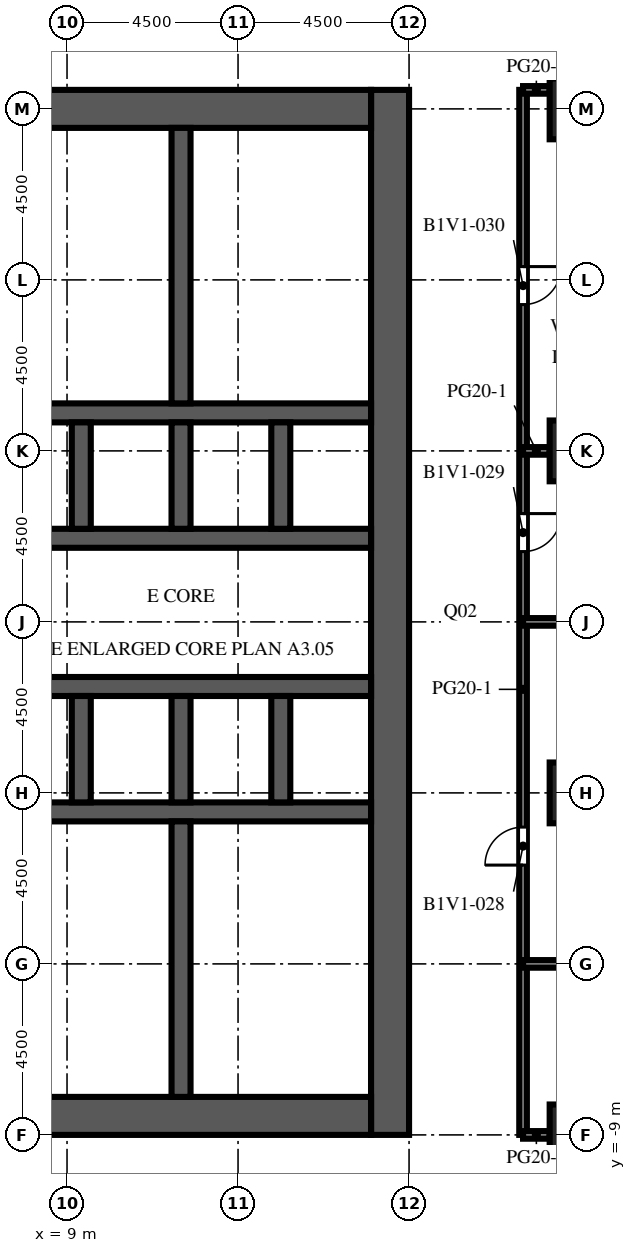
"""IFC4 building model, lengths in metres.
Left out: names, types, materials, properties, quantities, classifications, styles, units other than length and angle.
Written with IfcOpenShell. Run it as: python <this file> out.ifc"""

import sys

from ifc_helpers import new_model, si_unit, direction, frame, frame_2d, origin, origin_2d, place, context, subcontext, project, spatial, rectangle, extrude, element, fill, save


model = new_model("IFC4")
c1 = context("Model", 3, precision=1e-05, world=origin(), true_north=direction((0.0, 1.0)))
c2 = subcontext(c1, "Body", "Model", "MODEL_VIEW")
j1 = project(units=[si_unit("LENGTHUNIT", "METRE"), si_unit("PLANEANGLEUNIT", "RADIAN")], contexts=[c1])
p1 = place(None, origin())
s1 = spatial("IfcSite", under=j1, at=p1, CompositionType="ELEMENT")
p2 = place(p1, origin())
s2 = spatial("IfcBuilding", under=s1, at=p2, CompositionType="ELEMENT")
p3 = place(p2, frame((0.0, 0.0, 27.7)))
s3 = spatial("IfcBuildingStorey", under=s2, at=p3, CompositionType="ELEMENT", Elevation=27.7)
for number, where, z_axis, x_axis in (
    (1, (22.5, -9.0, 0.0), (0.0, 0.0, 1.0), (1.0, 0.0, 0.0)),
    (2, (22.5, 0.0, 0.0), (0.0, 0.0, 1.0), (1.0, 0.0, 0.0)),
    (3, (22.5, 9.0, 0.0), (0.0, 0.0, 1.0), (1.0, 0.0, 0.0)),
    (4, (22.5, 18.0, 0.0), (0.0, 0.0, 1.0), (1.0, 0.0, 0.0)),
):
    element("IfcColumn", number, at=place(p3, frame(where, z_axis=z_axis, x_axis=x_axis)), inside=s3, PredefinedType="COLUMN", context=c2, shape_type="SweptSolid", body=[
        extrude(rectangle(XDim=1.6, YDim=1.6, at=origin_2d()), origin(), (0.0, 0.0, 1.0), 4.1),
    ])
p4 = place(p3, frame((17.5, -9.0, 0.0), z_axis=(0.0, 0.0, 1.0), x_axis=(0.0, 1.0, 0.0)))
e5 = element("IfcWall", 5, at=p4, inside=s3, PredefinedType="SHEAR", context=c2, shape_type="SweptSolid", body=[
    extrude(rectangle(XDim=27.5, YDim=1.0, at=frame_2d((13.75, 0.0))), origin(), (0.0, 0.0, 1.0), 4.1),
])
p5 = place(p4, frame((12.55, 0.0, 0.0)))
e6 = element("IfcOpeningElement", 6, at=p5, cuts=e5, PredefinedType="OPENING", context=c2, shape_type="SweptSolid", body=[
    extrude(rectangle(XDim=2.4, YDim=2.4, at=frame_2d((1.2, 1.2))), frame((0.0, 0.51, 0.0), z_axis=(0.0, -1.0, 0.0), x_axis=(1.0, 0.0, 0.0)), (0.0, 0.0, 1.0), 1.02),
])
p6 = place(p4, frame((6.825, 0.0, 0.0)))
e7 = element("IfcOpeningElement", 7, at=p6, cuts=e5, PredefinedType="OPENING", context=c2, shape_type="SweptSolid", body=[
    extrude(rectangle(XDim=1.2, YDim=2.1, at=frame_2d((0.6, 1.05))), frame((0.0, 0.51, 0.0), z_axis=(0.0, -1.0, 0.0), x_axis=(1.0, 0.0, 0.0)), (0.0, 0.0, 1.0), 1.02),
])
p7 = place(p4, frame((19.475, 0.0, 0.0)))
e8 = element("IfcOpeningElement", 8, at=p7, cuts=e5, PredefinedType="OPENING", context=c2, shape_type="SweptSolid", body=[
    extrude(rectangle(XDim=1.2, YDim=2.1, at=frame_2d((0.6, 1.05))), frame((0.0, 0.51, 0.0), z_axis=(0.0, -1.0, 0.0), x_axis=(1.0, 0.0, 0.0)), (0.0, 0.0, 1.0), 1.02),
])
for number, where, z_axis, x_axis in (
    (9, (7.0, -8.5, 0.0), (0.0, 0.0, 1.0), (1.0, 0.0, 0.0)),
    (10, (7.0, 18.0, 0.0), (0.0, 0.0, 1.0), (1.0, 0.0, 0.0)),
):
    element("IfcWall", number, at=place(p3, frame(where, z_axis=z_axis, x_axis=x_axis)), inside=s3, PredefinedType="SHEAR", context=c2, shape_type="SweptSolid", body=[
        extrude(rectangle(XDim=10.0, YDim=1.0, at=frame_2d((5.0, 0.0))), origin(), (0.0, 0.0, 1.0), 4.1),
    ])
p8 = place(p3, frame((7.0, -0.5, 0.0), z_axis=(0.0, 0.0, 1.0), x_axis=(1.0, 0.0, 0.0)))
e11 = element("IfcWall", 11, at=p8, inside=s3, PredefinedType="SHEAR", context=c2, shape_type="SweptSolid", body=[
    extrude(rectangle(XDim=10.0, YDim=0.5, at=frame_2d((5.0, 0.0))), origin(), (0.0, 0.0, 1.0), 4.1),
])
p9 = place(p3, frame((7.0, 2.8, 0.0), z_axis=(0.0, 0.0, 1.0), x_axis=(1.0, 0.0, 0.0)))
e12 = element("IfcWall", 12, at=p9, inside=s3, PredefinedType="SHEAR", context=c2, shape_type="SweptSolid", body=[
    extrude(rectangle(XDim=10.0, YDim=0.5, at=frame_2d((5.0, 0.0))), origin(), (0.0, 0.0, 1.0), 4.1),
])
p10 = place(p9, frame((0.512, 0.0, 0.0)))
e13 = element("IfcOpeningElement", 13, at=p10, cuts=e12, PredefinedType="OPENING", context=c2, shape_type="SweptSolid", body=[
    extrude(rectangle(XDim=1.1, YDim=2.1, at=frame_2d((0.55, 1.05))), frame((0.0, 0.26, 0.0), z_axis=(0.0, -1.0, 0.0), x_axis=(1.0, 0.0, 0.0)), (0.0, 0.0, 1.0), 0.52),
])
p11 = place(p9, frame((3.137, 0.0, 0.0)))
e14 = element("IfcOpeningElement", 14, at=p11, cuts=e12, PredefinedType="OPENING", context=c2, shape_type="SweptSolid", body=[
    extrude(rectangle(XDim=1.1, YDim=2.1, at=frame_2d((0.55, 1.05))), frame((0.0, 0.26, 0.0), z_axis=(0.0, -1.0, 0.0), x_axis=(1.0, 0.0, 0.0)), (0.0, 0.0, 1.0), 0.52),
])
p12 = place(p9, frame((8.387, 0.0, 0.0)))
e15 = element("IfcOpeningElement", 15, at=p12, cuts=e12, PredefinedType="OPENING", context=c2, shape_type="SweptSolid", body=[
    extrude(rectangle(XDim=1.1, YDim=2.1, at=frame_2d((0.55, 1.05))), frame((0.0, 0.26, 0.0), z_axis=(0.0, -1.0, 0.0), x_axis=(1.0, 0.0, 0.0)), (0.0, 0.0, 1.0), 0.52),
])
p13 = place(p3, frame((7.0, 6.7, 0.0), z_axis=(0.0, 0.0, 1.0), x_axis=(1.0, 0.0, 0.0)))
e16 = element("IfcWall", 16, at=p13, inside=s3, PredefinedType="SHEAR", context=c2, shape_type="SweptSolid", body=[
    extrude(rectangle(XDim=10.0, YDim=0.5, at=frame_2d((5.0, 0.0))), origin(), (0.0, 0.0, 1.0), 4.1),
])
p14 = place(p13, frame((0.512, 0.0, 0.0)))
e17 = element("IfcOpeningElement", 17, at=p14, cuts=e16, PredefinedType="OPENING", context=c2, shape_type="SweptSolid", body=[
    extrude(rectangle(XDim=1.1, YDim=2.1, at=frame_2d((0.55, 1.05))), frame((0.0, 0.26, 0.0), z_axis=(0.0, -1.0, 0.0), x_axis=(1.0, 0.0, 0.0)), (0.0, 0.0, 1.0), 0.52),
])
p15 = place(p13, frame((3.188, 0.0, 0.0)))
e18 = element("IfcOpeningElement", 18, at=p15, cuts=e16, PredefinedType="OPENING", context=c2, shape_type="SweptSolid", body=[
    extrude(rectangle(XDim=1.0, YDim=2.1, at=frame_2d((0.5, 1.05))), frame((0.0, 0.26, 0.0), z_axis=(0.0, -1.0, 0.0), x_axis=(1.0, 0.0, 0.0)), (0.0, 0.0, 1.0), 0.52),
])
p16 = place(p13, frame((5.812, 0.0, 0.0)))
e19 = element("IfcOpeningElement", 19, at=p16, cuts=e16, PredefinedType="OPENING", context=c2, shape_type="SweptSolid", body=[
    extrude(rectangle(XDim=1.0, YDim=2.1, at=frame_2d((0.5, 1.05))), frame((0.0, 0.26, 0.0), z_axis=(0.0, -1.0, 0.0), x_axis=(1.0, 0.0, 0.0)), (0.0, 0.0, 1.0), 0.52),
])
p17 = place(p13, frame((8.438, 0.0, 0.0)))
e20 = element("IfcOpeningElement", 20, at=p17, cuts=e16, PredefinedType="OPENING", context=c2, shape_type="SweptSolid", body=[
    extrude(rectangle(XDim=1.0, YDim=2.1, at=frame_2d((0.5, 1.05))), frame((0.0, 0.26, 0.0), z_axis=(0.0, -1.0, 0.0), x_axis=(1.0, 0.0, 0.0)), (0.0, 0.0, 1.0), 0.52),
])
p18 = place(p3, frame((7.0, 10.0, 0.0), z_axis=(0.0, 0.0, 1.0), x_axis=(1.0, 0.0, 0.0)))
e21 = element("IfcWall", 21, at=p18, inside=s3, PredefinedType="SHEAR", context=c2, shape_type="SweptSolid", body=[
    extrude(rectangle(XDim=10.0, YDim=0.5, at=frame_2d((5.0, 0.0))), origin(), (0.0, 0.0, 1.0), 4.1),
])
for number, where, z_axis, x_axis in (
    (22, (9.375, -0.25, 0.0), (0.0, 0.0, 1.0), (0.0, 1.0, 0.0)),
    (23, (9.375, 6.95, 0.0), (0.0, 0.0, 1.0), (0.0, 1.0, 0.0)),
    (24, (12.0, -0.25, 0.0), (0.0, 0.0, 1.0), (0.0, 1.0, 0.0)),
    (25, (12.0, 6.95, 0.0), (0.0, 0.0, 1.0), (0.0, 1.0, 0.0)),
    (26, (14.625, -0.25, 0.0), (0.0, 0.0, 1.0), (0.0, 1.0, 0.0)),
    (27, (14.625, 6.95, 0.0), (0.0, 0.0, 1.0), (0.0, 1.0, 0.0)),
):
    element("IfcWall", number, at=place(p3, frame(where, z_axis=z_axis, x_axis=x_axis)), inside=s3, PredefinedType="SHEAR", context=c2, shape_type="SweptSolid", body=[
        extrude(rectangle(XDim=2.8, YDim=0.5, at=frame_2d((1.4, 0.0))), origin(), (0.0, 0.0, 1.0), 4.1),
    ])
for number, where, z_axis, x_axis in (
    (28, (12.0, -8.0, 0.0), (0.0, 0.0, 1.0), (0.0, 1.0, 0.0)),
    (29, (12.0, 10.25, 0.0), (0.0, 0.0, 1.0), (0.0, 1.0, 0.0)),
):
    element("IfcWall", number, at=place(p3, frame(where, z_axis=z_axis, x_axis=x_axis)), inside=s3, PredefinedType="SHEAR", context=c2, shape_type="SweptSolid", body=[
        extrude(rectangle(XDim=7.25, YDim=0.5, at=frame_2d((3.625, 0.0))), origin(), (0.0, 0.0, 1.0), 4.1),
    ])
p19 = place(p3, frame((7.0, -5.245, 0.0), z_axis=(0.0, 0.0, 1.0), x_axis=(1.0, 0.0, 0.0)))
e30 = element("IfcWall", 30, at=p19, inside=s3, PredefinedType="PARTITIONING", context=c2, shape_type="SweptSolid", body=[
    extrude(rectangle(XDim=4.75, YDim=0.1, at=frame_2d((2.375, 0.0))), origin(), (0.0, 0.0, 1.0), 3.65),
])
p20 = place(p19, frame((1.875, 0.0, 0.0)))
e31 = element("IfcOpeningElement", 31, at=p20, cuts=e30, PredefinedType="OPENING", context=c2, shape_type="SweptSolid", body=[
    extrude(rectangle(XDim=1.0, YDim=2.1, at=frame_2d((0.5, 1.05))), frame((0.0, 0.06, 0.0), z_axis=(0.0, -1.0, 0.0), x_axis=(1.0, 0.0, 0.0)), (0.0, 0.0, 1.0), 0.12),
])
p21 = place(p3, frame((7.0, -3.94, 0.0), z_axis=(0.0, 0.0, 1.0), x_axis=(1.0, 0.0, 0.0)))
e32 = element("IfcWall", 32, at=p21, inside=s3, PredefinedType="PARTITIONING", context=c2, shape_type="SweptSolid", body=[
    extrude(rectangle(XDim=2.945, YDim=0.1, at=frame_2d((1.473, 0.0))), origin(), (0.0, 0.0, 1.0), 3.65),
])
p22 = place(p21, frame((0.972, 0.0, 0.0)))
e33 = element("IfcOpeningElement", 33, at=p22, cuts=e32, PredefinedType="OPENING", context=c2, shape_type="SweptSolid", body=[
    extrude(rectangle(XDim=1.0, YDim=2.1, at=frame_2d((0.5, 1.05))), frame((0.0, 0.06, 0.0), z_axis=(0.0, -1.0, 0.0), x_axis=(1.0, 0.0, 0.0)), (0.0, 0.0, 1.0), 0.12),
])
p23 = place(p3, frame((9.945, -3.94, 0.0), z_axis=(0.0, 0.0, 1.0), x_axis=(1.0, 0.0, 0.0)))
e34 = element("IfcWall", 34, at=p23, inside=s3, PredefinedType="PARTITIONING", context=c2, shape_type="SweptSolid", body=[
    extrude(rectangle(XDim=1.805, YDim=0.1, at=frame_2d((0.902, 0.0))), origin(), (0.0, 0.0, 1.0), 3.65),
])
p24 = place(p23, frame((0.403, 0.0, 0.0)))
e35 = element("IfcOpeningElement", 35, at=p24, cuts=e34, PredefinedType="OPENING", context=c2, shape_type="SweptSolid", body=[
    extrude(rectangle(XDim=1.0, YDim=2.1, at=frame_2d((0.5, 1.05))), frame((0.0, 0.06, 0.0), z_axis=(0.0, -1.0, 0.0), x_axis=(1.0, 0.0, 0.0)), (0.0, 0.0, 1.0), 0.12),
])
p25 = place(p3, frame((9.945, -3.94, 0.0), z_axis=(0.0, 0.0, 1.0), x_axis=(0.0, 1.0, 0.0)))
e36 = element("IfcWall", 36, at=p25, inside=s3, PredefinedType="PARTITIONING", context=c2, shape_type="SweptSolid", body=[
    extrude(rectangle(XDim=3.19, YDim=0.1, at=frame_2d((1.595, 0.0))), origin(), (0.0, 0.0, 1.0), 3.65),
])
for number, where, z_axis, x_axis in (
    (37, (8.3, 12.425, 0.0), (0.0, 0.0, 1.0), (1.0, 0.0, 0.0)),
    (38, (8.3, 14.962, 0.0), (0.0, 0.0, 1.0), (1.0, 0.0, 0.0)),
):
    element("IfcWall", number, at=place(p3, frame(where, z_axis=z_axis, x_axis=x_axis)), inside=s3, PredefinedType="PARTITIONING", context=c2, shape_type="SweptSolid", body=[
        extrude(rectangle(XDim=3.45, YDim=0.1, at=frame_2d((1.725, 0.0))), origin(), (0.0, 0.0, 1.0), 3.65),
    ])
p26 = place(p3, frame((21.0, 18.5, 0.0), z_axis=(0.0, 0.0, 1.0), x_axis=(0.0, -1.0, 0.0)))
e39 = element("IfcWall", 39, at=p26, inside=s3, PredefinedType="PARTITIONING", context=c2, shape_type="SweptSolid", body=[
    extrude(rectangle(XDim=27.5, YDim=0.2, at=frame_2d((13.75, 0.0))), origin(), (0.0, 0.0, 1.0), 3.65),
])
p27 = place(p26, frame((19.4, 0.0, 0.0)))
e40 = element("IfcOpeningElement", 40, at=p27, cuts=e39, PredefinedType="OPENING", context=c2, shape_type="SweptSolid", body=[
    extrude(rectangle(XDim=1.0, YDim=2.1, at=frame_2d((0.5, 1.05))), frame((0.0, 0.11, 0.0), z_axis=(0.0, -1.0, 0.0), x_axis=(1.0, 0.0, 0.0)), (0.0, 0.0, 1.0), 0.22),
])
p28 = place(p26, frame((11.15, 0.0, 0.0)))
e41 = element("IfcOpeningElement", 41, at=p28, cuts=e39, PredefinedType="OPENING", context=c2, shape_type="SweptSolid", body=[
    extrude(rectangle(XDim=1.0, YDim=2.1, at=frame_2d((0.5, 1.05))), frame((0.0, 0.11, 0.0), z_axis=(0.0, -1.0, 0.0), x_axis=(1.0, 0.0, 0.0)), (0.0, 0.0, 1.0), 0.22),
])
p29 = place(p26, frame((4.65, 0.0, 0.0)))
e42 = element("IfcOpeningElement", 42, at=p29, cuts=e39, PredefinedType="OPENING", context=c2, shape_type="SweptSolid", body=[
    extrude(rectangle(XDim=1.0, YDim=2.1, at=frame_2d((0.5, 1.05))), frame((0.0, 0.11, 0.0), z_axis=(0.0, -1.0, 0.0), x_axis=(1.0, 0.0, 0.0)), (0.0, 0.0, 1.0), 0.22),
])
p30 = place(p3, frame((21.0, -9.0, 0.0), z_axis=(0.0, 0.0, 1.0), x_axis=(1.0, 0.0, 0.0)))
e43 = element("IfcWall", 43, at=p30, inside=s3, PredefinedType="PARTITIONING", context=c2, shape_type="SweptSolid", body=[
    extrude(rectangle(XDim=0.7, YDim=0.2, at=frame_2d((0.35, 0.0))), origin(), (0.0, 0.0, 1.0), 3.65),
])
for number, where, z_axis, x_axis in (
    (44, (21.0, -4.5, 0.0), (0.0, 0.0, 1.0), (1.0, 0.0, 0.0)),
    (45, (21.0, 4.5, 0.0), (0.0, 0.0, 1.0), (1.0, 0.0, 0.0)),
):
    element("IfcWall", number, at=place(p3, frame(where, z_axis=z_axis, x_axis=x_axis)), inside=s3, PredefinedType="PARTITIONING", context=c2, shape_type="SweptSolid", body=[
        extrude(rectangle(XDim=5.3, YDim=0.2, at=frame_2d((2.65, 0.0))), origin(), (0.0, 0.0, 1.0), 3.65),
    ])
for number, where, z_axis, x_axis in (
    (46, (21.0, 9.0, 0.0), (0.0, 0.0, 1.0), (1.0, 0.0, 0.0)),
    (47, (21.0, 18.5, 0.0), (0.0, 0.0, 1.0), (1.0, 0.0, 0.0)),
):
    element("IfcWall", number, at=place(p3, frame(where, z_axis=z_axis, x_axis=x_axis)), inside=s3, PredefinedType="PARTITIONING", context=c2, shape_type="SweptSolid", body=[
        extrude(rectangle(XDim=0.7, YDim=0.2, at=frame_2d((0.35, 0.0))), origin(), (0.0, 0.0, 1.0), 3.65),
    ])
p31 = place(p11, origin())
e48 = element("IfcDoor", 48, at=p31, inside=s3, OperationType="DOUBLE_DOOR_SLIDING", PredefinedType="DOOR", context=c2, shape_type="SweptSolid", body=[
    extrude(rectangle(XDim=1.1, YDim=2.1, at=frame_2d((0.55, 1.05))), frame((0.0, 0.025, 0.0), z_axis=(0.0, -1.0, 0.0), x_axis=(1.0, 0.0, 0.0)), (0.0, 0.0, 1.0), 0.05),
])
fill(e14, e48)
p32 = place(p12, origin())
e49 = element("IfcDoor", 49, at=p32, inside=s3, OperationType="DOUBLE_DOOR_SLIDING", PredefinedType="DOOR", context=c2, shape_type="SweptSolid", body=[
    extrude(rectangle(XDim=1.1, YDim=2.1, at=frame_2d((0.55, 1.05))), frame((0.0, 0.025, 0.0), z_axis=(0.0, -1.0, 0.0), x_axis=(1.0, 0.0, 0.0)), (0.0, 0.0, 1.0), 0.05),
])
fill(e15, e49)
p33 = place(p5, origin())
e50 = element("IfcDoor", 50, at=p33, inside=s3, OperationType="DOUBLE_DOOR_DOUBLE_SWING", PredefinedType="DOOR", context=c2, shape_type="SweptSolid", body=[
    extrude(rectangle(XDim=2.4, YDim=2.4, at=frame_2d((1.2, 1.2))), frame((0.0, 0.025, 0.0), z_axis=(0.0, -1.0, 0.0), x_axis=(1.0, 0.0, 0.0)), (0.0, 0.0, 1.0), 0.05),
])
fill(e6, e50)
p34 = place(p6, frame((1.2, 0.0, 0.0), z_axis=(0.0, 0.0, 1.0), x_axis=(-1.0, 0.0, 0.0)))
e51 = element("IfcDoor", 51, at=p34, inside=s3, OperationType="SINGLE_SWING_LEFT", PredefinedType="DOOR", context=c2, shape_type="SweptSolid", body=[
    extrude(rectangle(XDim=1.2, YDim=2.1, at=frame_2d((0.6, 1.05))), frame((0.0, 0.025, 0.0), z_axis=(0.0, -1.0, 0.0), x_axis=(1.0, 0.0, 0.0)), (0.0, 0.0, 1.0), 0.05),
])
fill(e7, e51)
p35 = place(p7, frame((1.2, 0.0, 0.0), z_axis=(0.0, 0.0, 1.0), x_axis=(-1.0, 0.0, 0.0)))
e52 = element("IfcDoor", 52, at=p35, inside=s3, OperationType="SINGLE_SWING_LEFT", PredefinedType="DOOR", context=c2, shape_type="SweptSolid", body=[
    extrude(rectangle(XDim=1.2, YDim=2.1, at=frame_2d((0.6, 1.05))), frame((0.0, 0.025, 0.0), z_axis=(0.0, -1.0, 0.0), x_axis=(1.0, 0.0, 0.0)), (0.0, 0.0, 1.0), 0.05),
])
fill(e8, e52)
p36 = place(p15, origin())
e53 = element("IfcDoor", 53, at=p36, inside=s3, OperationType="SINGLE_SWING_RIGHT", PredefinedType="DOOR", context=c2, shape_type="SweptSolid", body=[
    extrude(rectangle(XDim=1.0, YDim=2.1, at=frame_2d((0.5, 1.05))), frame((0.0, 0.025, 0.0), z_axis=(0.0, -1.0, 0.0), x_axis=(1.0, 0.0, 0.0)), (0.0, 0.0, 1.0), 0.05),
])
fill(e18, e53)
p37 = place(p16, origin())
e54 = element("IfcDoor", 54, at=p37, inside=s3, OperationType="SINGLE_SWING_LEFT", PredefinedType="DOOR", context=c2, shape_type="SweptSolid", body=[
    extrude(rectangle(XDim=1.0, YDim=2.1, at=frame_2d((0.5, 1.05))), frame((0.0, 0.025, 0.0), z_axis=(0.0, -1.0, 0.0), x_axis=(1.0, 0.0, 0.0)), (0.0, 0.0, 1.0), 0.05),
])
fill(e19, e54)
p38 = place(p17, origin())
e55 = element("IfcDoor", 55, at=p38, inside=s3, OperationType="SINGLE_SWING_RIGHT", PredefinedType="DOOR", context=c2, shape_type="SweptSolid", body=[
    extrude(rectangle(XDim=1.0, YDim=2.1, at=frame_2d((0.5, 1.05))), frame((0.0, 0.025, 0.0), z_axis=(0.0, -1.0, 0.0), x_axis=(1.0, 0.0, 0.0)), (0.0, 0.0, 1.0), 0.05),
])
fill(e20, e55)
p39 = place(p20, origin())
e56 = element("IfcDoor", 56, at=p39, inside=s3, OperationType="SINGLE_SWING_LEFT", PredefinedType="DOOR", context=c2, shape_type="SweptSolid", body=[
    extrude(rectangle(XDim=1.0, YDim=2.1, at=frame_2d((0.5, 1.05))), frame((0.0, 0.025, 0.0), z_axis=(0.0, -1.0, 0.0), x_axis=(1.0, 0.0, 0.0)), (0.0, 0.0, 1.0), 0.05),
])
fill(e31, e56)
p40 = place(p22, origin())
e57 = element("IfcDoor", 57, at=p40, inside=s3, OperationType="SINGLE_SWING_RIGHT", PredefinedType="DOOR", context=c2, shape_type="SweptSolid", body=[
    extrude(rectangle(XDim=1.0, YDim=2.1, at=frame_2d((0.5, 1.05))), frame((0.0, 0.025, 0.0), z_axis=(0.0, -1.0, 0.0), x_axis=(1.0, 0.0, 0.0)), (0.0, 0.0, 1.0), 0.05),
])
fill(e33, e57)
p41 = place(p24, origin())
e58 = element("IfcDoor", 58, at=p41, inside=s3, OperationType="SINGLE_SWING_LEFT", PredefinedType="DOOR", context=c2, shape_type="SweptSolid", body=[
    extrude(rectangle(XDim=1.0, YDim=2.1, at=frame_2d((0.5, 1.05))), frame((0.0, 0.025, 0.0), z_axis=(0.0, -1.0, 0.0), x_axis=(1.0, 0.0, 0.0)), (0.0, 0.0, 1.0), 0.05),
])
fill(e35, e58)
p42 = place(p27, origin())
e59 = element("IfcDoor", 59, at=p42, inside=s3, OperationType="SINGLE_SWING_RIGHT", PredefinedType="DOOR", context=c2, shape_type="SweptSolid", body=[
    extrude(rectangle(XDim=1.0, YDim=2.1, at=frame_2d((0.5, 1.05))), frame((0.0, 0.025, 0.0), z_axis=(0.0, -1.0, 0.0), x_axis=(1.0, 0.0, 0.0)), (0.0, 0.0, 1.0), 0.05),
])
fill(e40, e59)
p43 = place(p28, origin())
e60 = element("IfcDoor", 60, at=p43, inside=s3, OperationType="SINGLE_SWING_LEFT", PredefinedType="DOOR", context=c2, shape_type="SweptSolid", body=[
    extrude(rectangle(XDim=1.0, YDim=2.1, at=frame_2d((0.5, 1.05))), frame((0.0, 0.025, 0.0), z_axis=(0.0, -1.0, 0.0), x_axis=(1.0, 0.0, 0.0)), (0.0, 0.0, 1.0), 0.05),
])
fill(e41, e60)
p44 = place(p29, origin())
e61 = element("IfcDoor", 61, at=p44, inside=s3, OperationType="SINGLE_SWING_LEFT", PredefinedType="DOOR", context=c2, shape_type="SweptSolid", body=[
    extrude(rectangle(XDim=1.0, YDim=2.1, at=frame_2d((0.5, 1.05))), frame((0.0, 0.025, 0.0), z_axis=(0.0, -1.0, 0.0), x_axis=(1.0, 0.0, 0.0)), (0.0, 0.0, 1.0), 0.05),
])
fill(e42, e61)
save(model, sys.argv[1])
